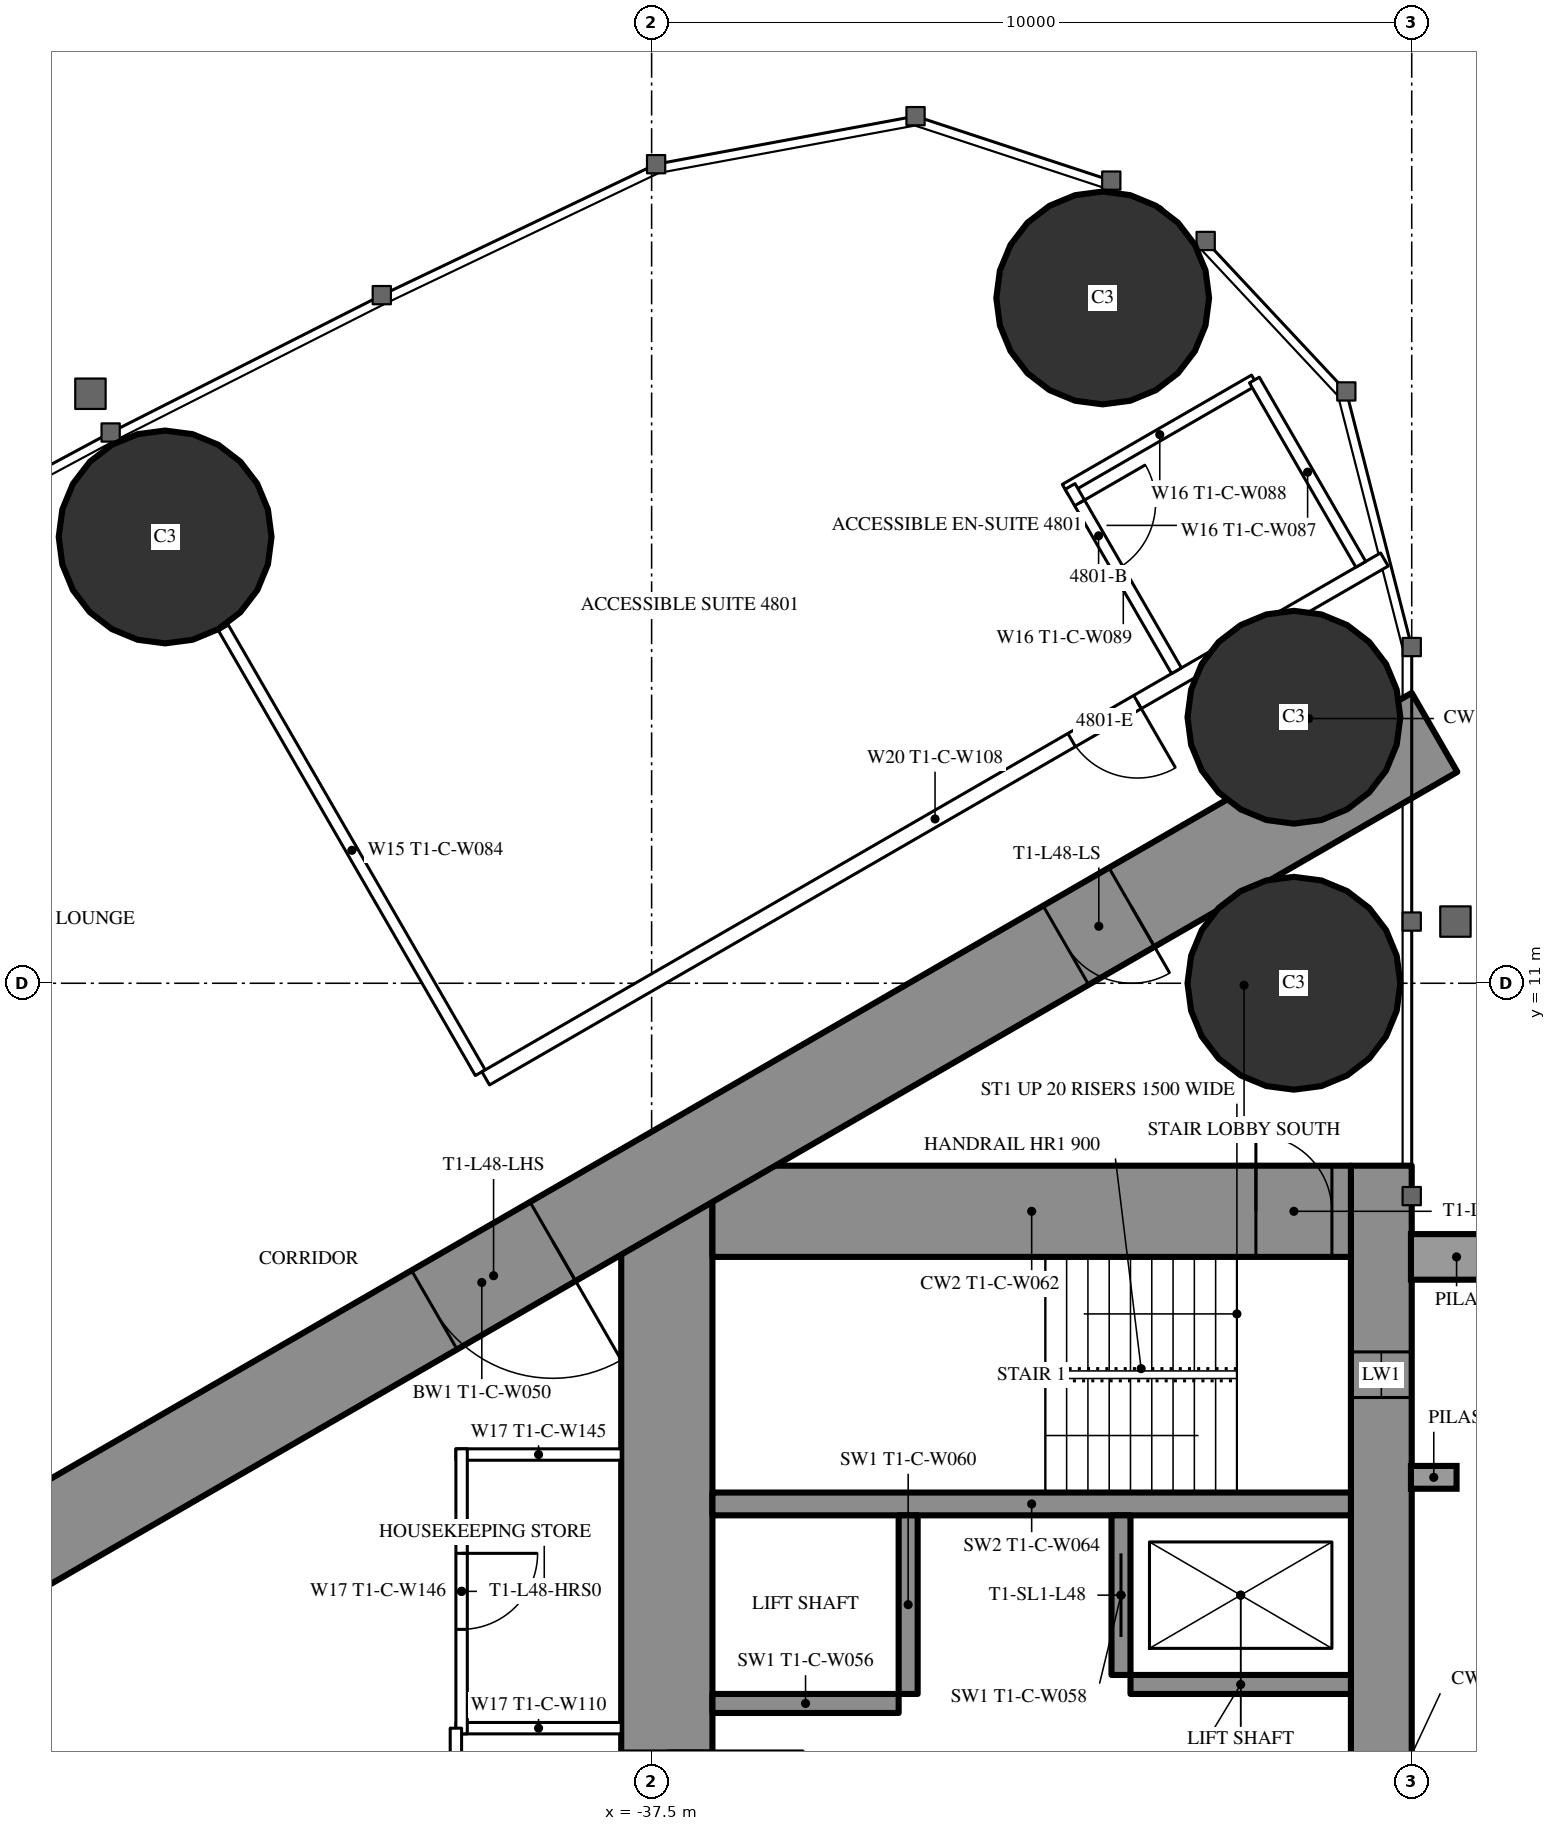
"""IFC4 building model, lengths in metres.
Left out: names, types, materials, properties, quantities, classifications, styles, units other than length and angle.
Written with IfcOpenShell. Run it as: python <this file> out.ifc"""

import sys

from ifc_helpers import new_model, si_unit, direction, frame, frame_2d, origin, origin_2d, place, context, subcontext, project, spatial, rectangle, circle, extrude, element, fill, save


model = new_model("IFC4")
c1 = context("Model", 3, precision=1e-05, world=origin(), true_north=direction((0.0, 1.0)))
c2 = subcontext(c1, "Body", "Model", "MODEL_VIEW")
j1 = project(units=[si_unit("LENGTHUNIT", "METRE"), si_unit("PLANEANGLEUNIT", "RADIAN")], contexts=[c1])
p1 = place(None, origin())
s1 = spatial("IfcSite", under=j1, at=p1, CompositionType="ELEMENT")
p2 = place(p1, origin())
s2 = spatial("IfcBuilding", under=s1, at=p2, CompositionType="ELEMENT")
p3 = place(p2, frame((0.0, 0.0, 180.8)))
s3 = spatial("IfcBuildingStorey", under=s2, at=p3, CompositionType="ELEMENT", Elevation=180.8)
for number, where, z_axis, x_axis in (
    (1, (-31.565, 20.016, 0.0), (0.0, 0.0, 1.0), (1.0, 0.0, 0.0)),
    (2, (-29.05, 11.0, 0.0), (0.0, 0.0, 1.0), (1.0, 0.0, 0.0)),
    (3, (-29.05, 14.5, 0.0), (0.0, 0.0, 1.0), (1.0, 0.0, 0.0)),
    (4, (-43.9, 16.871, 0.0), (0.0, 0.0, 1.0), (1.0, 0.0, 0.0)),
):
    element("IfcColumn", number, at=place(p3, frame(where, z_axis=z_axis, x_axis=x_axis)), inside=s3, PredefinedType="COLUMN", context=c2, shape_type="SweptSolid", body=[
        extrude(circle(Radius=1.4, at=origin_2d()), origin(), (0.0, 0.0, 1.0), 3.5),
    ])
p4 = place(p3, frame((-27.9, 8.6, 0.0), z_axis=(0.0, 0.0, 1.0), x_axis=(0.0, -1.0, 0.0)))
e5 = element("IfcWall", 5, at=p4, inside=s3, PredefinedType="SHEAR", context=c2, shape_type="SweptSolid", body=[
    extrude(rectangle(XDim=17.2, YDim=0.8, at=frame_2d((8.6, 0.0))), origin(), (0.0, 0.0, 1.0), 3.5),
])
p5 = place(p4, frame((2.45, 0.0, 0.6)))
e6 = element("IfcOpeningElement", 6, at=p5, cuts=e5, PredefinedType="OPENING", context=c2, shape_type="SweptSolid", body=[
    extrude(rectangle(XDim=0.6, YDim=2.1, at=frame_2d((0.3, 1.05))), frame((0.0, 0.41, 0.0), z_axis=(0.0, -1.0, 0.0), x_axis=(1.0, 0.0, 0.0)), (0.0, 0.0, 1.0), 0.82),
])
p6 = place(p4, frame((14.15, 0.0, 0.6)))
e7 = element("IfcOpeningElement", 7, at=p6, cuts=e5, PredefinedType="OPENING", context=c2, shape_type="SweptSolid", body=[
    extrude(rectangle(XDim=0.6, YDim=2.1, at=frame_2d((0.3, 1.05))), frame((0.0, 0.41, 0.0), z_axis=(0.0, -1.0, 0.0), x_axis=(1.0, 0.0, 0.0)), (0.0, 0.0, 1.0), 0.82),
])
p7 = place(p3, frame((-37.3, 8.6, 0.0), z_axis=(0.0, 0.0, 1.0), x_axis=(0.0, -1.0, 0.0)))
e8 = element("IfcWall", 8, at=p7, inside=s3, PredefinedType="SHEAR", context=c2, shape_type="SweptSolid", body=[
    extrude(rectangle(XDim=17.2, YDim=1.2, at=frame_2d((8.6, 0.0))), origin(), (0.0, 0.0, 1.0), 3.5),
])
p8 = place(p7, frame((7.7, 0.0, 0.0)))
e9 = element("IfcOpeningElement", 9, at=p8, cuts=e8, PredefinedType="OPENING", context=c2, shape_type="SweptSolid", body=[
    extrude(rectangle(XDim=1.8, YDim=2.2, at=frame_2d((0.9, 1.1))), frame((0.0, 0.61, 0.0), z_axis=(0.0, -1.0, 0.0), x_axis=(1.0, 0.0, 0.0)), (0.0, 0.0, 1.0), 1.22),
])
p9 = place(p3, frame((-28.3, 8.0, 0.0), z_axis=(0.0, 0.0, 1.0), x_axis=(-1.0, 0.0, 0.0)))
e10 = element("IfcWall", 10, at=p9, inside=s3, PredefinedType="SHEAR", context=c2, shape_type="SweptSolid", body=[
    extrude(rectangle(XDim=8.4, YDim=1.2, at=frame_2d((4.2, 0.0))), origin(), (0.0, 0.0, 1.0), 3.5),
])
p10 = place(p9, frame((0.25, 0.0, 0.0)))
e11 = element("IfcOpeningElement", 11, at=p10, cuts=e10, PredefinedType="OPENING", context=c2, shape_type="SweptSolid", body=[
    extrude(rectangle(XDim=1.0, YDim=2.2, at=frame_2d((0.5, 1.1))), frame((0.0, 0.61, 0.0), z_axis=(0.0, -1.0, 0.0), x_axis=(1.0, 0.0, 0.0)), (0.0, 0.0, 1.0), 1.22),
])
p11 = place(p3, frame((-28.3, 4.15, 0.0), z_axis=(0.0, 0.0, 1.0), x_axis=(-1.0, 0.0, 0.0)))
e12 = element("IfcWall", 12, at=p11, inside=s3, PredefinedType="SHEAR", context=c2, shape_type="SweptSolid", body=[
    extrude(rectangle(XDim=8.4, YDim=0.3, at=frame_2d((4.2, 0.0))), origin(), (0.0, 0.0, 1.0), 3.5),
])
p12 = place(p3, frame((-31.325, 4.0, 0.0), z_axis=(0.0, 0.0, 1.0), x_axis=(0.0, -1.0, 0.0)))
e13 = element("IfcWall", 13, at=p12, inside=s3, PredefinedType="SHEAR", context=c2, shape_type="SweptSolid", body=[
    extrude(rectangle(XDim=2.1, YDim=0.25, at=frame_2d((1.05, 0.0))), origin(), (0.0, 0.0, 1.0), 3.5),
])
p13 = place(p12, frame((0.5, 0.0, 0.0)))
e14 = element("IfcOpeningElement", 14, at=p13, cuts=e13, PredefinedType="OPENING", context=c2, shape_type="SweptSolid", body=[
    extrude(rectangle(XDim=1.1, YDim=2.2, at=frame_2d((0.55, 1.1))), frame((0.0, 0.135, 0.0), z_axis=(0.0, -1.0, 0.0), x_axis=(1.0, 0.0, 0.0)), (0.0, 0.0, 1.0), 0.27),
])
p14 = place(p3, frame((-34.125, 4.0, 0.0), z_axis=(0.0, 0.0, 1.0), x_axis=(0.0, -1.0, 0.0)))
e15 = element("IfcWall", 15, at=p14, inside=s3, PredefinedType="SHEAR", context=c2, shape_type="SweptSolid", body=[
    extrude(rectangle(XDim=2.35, YDim=0.25, at=frame_2d((1.175, 0.0))), origin(), (0.0, 0.0, 1.0), 3.5),
])
p15 = place(p3, frame((-28.3, 1.775, 0.0), z_axis=(0.0, 0.0, 1.0), x_axis=(-1.0, 0.0, 0.0)))
e16 = element("IfcWall", 16, at=p15, inside=s3, PredefinedType="SHEAR", context=c2, shape_type="SweptSolid", body=[
    extrude(rectangle(XDim=2.9, YDim=0.25, at=frame_2d((1.45, 0.0))), origin(), (0.0, 0.0, 1.0), 3.5),
])
p16 = place(p3, frame((-34.25, 1.525, 0.0), z_axis=(0.0, 0.0, 1.0), x_axis=(-1.0, 0.0, 0.0)))
e17 = element("IfcWall", 17, at=p16, inside=s3, PredefinedType="SHEAR", context=c2, shape_type="SweptSolid", body=[
    extrude(rectangle(XDim=2.45, YDim=0.25, at=frame_2d((1.225, 0.0))), origin(), (0.0, 0.0, 1.0), 3.5),
])
p17 = place(p3, frame((-27.2, 14.3, 0.0), z_axis=(0.0, 0.0, 1.0), x_axis=(-0.866026593062, -0.499997940104, 0.0)))
e18 = element("IfcWall", 18, at=p17, inside=s3, PredefinedType="SHEAR", context=c2, shape_type="SweptSolid", body=[
    extrude(rectangle(XDim=28.946, YDim=1.2, at=frame_2d((14.473, 0.0))), origin(), (0.0, 0.0, 1.0), 3.5),
])
p18 = place(p17, frame((4.6, 0.0, 0.0)))
e19 = element("IfcOpeningElement", 19, at=p18, cuts=e18, PredefinedType="OPENING", context=c2, shape_type="SweptSolid", body=[
    extrude(rectangle(XDim=1.0, YDim=2.2, at=frame_2d((0.5, 1.1))), frame((0.0, 0.61, 0.0), z_axis=(0.0, -1.0, 0.0), x_axis=(1.0, 0.0, 0.0)), (0.0, 0.0, 1.0), 1.22),
])
p19 = place(p17, frame((13.395, 0.0, 0.0)))
e20 = element("IfcOpeningElement", 20, at=p19, cuts=e18, PredefinedType="OPENING", context=c2, shape_type="SweptSolid", body=[
    extrude(rectangle(XDim=1.8, YDim=2.2, at=frame_2d((0.9, 1.1))), frame((0.0, 0.61, 0.0), z_axis=(0.0, -1.0, 0.0), x_axis=(1.0, 0.0, 0.0)), (0.0, 0.0, 1.0), 1.22),
])
p20 = place(p3, frame((-39.754, 9.823, 0.0), z_axis=(0.0, 0.0, 1.0), x_axis=(-0.499997670926, 0.866026748472, 0.0)))
e21 = element("IfcWall", 21, at=p20, inside=s3, PredefinedType="PARTITIONING", context=c2, shape_type="SweptSolid", body=[
    extrude(rectangle(XDim=6.757, YDim=0.15, at=frame_2d((3.379, 0.0))), origin(), (0.0, 0.0, 1.0), 2.3),
])
p21 = place(p3, frame((-27.86, 16.575, 0.0), z_axis=(0.0, 0.0, 1.0), x_axis=(-0.866026850238, -0.499997494661, 0.0)))
e22 = element("IfcWall", 22, at=p21, inside=s3, PredefinedType="PARTITIONING", context=c2, shape_type="SweptSolid", body=[
    extrude(rectangle(XDim=13.651, YDim=0.2, at=frame_2d((6.826, 0.0))), origin(), (0.0, 0.0, 1.0), 3.25),
])
p22 = place(p21, frame((3.75, 0.0, 0.0)))
e23 = element("IfcOpeningElement", 23, at=p22, cuts=e22, PredefinedType="OPENING", context=c2, shape_type="SweptSolid", body=[
    extrude(rectangle(XDim=1.0, YDim=2.2, at=frame_2d((0.5, 1.1))), frame((0.0, 0.11, 0.0), z_axis=(0.0, -1.0, 0.0), x_axis=(1.0, 0.0, 0.0)), (0.0, 0.0, 1.0), 0.22),
])
p23 = place(p3, frame((-29.57, 18.936, 0.0), z_axis=(0.0, 0.0, 1.0), x_axis=(-0.866018712932, -0.500011588718, 0.0)))
e24 = element("IfcWall", 24, at=p23, inside=s3, PredefinedType="PARTITIONING", context=c2, shape_type="SweptSolid", body=[
    extrude(rectangle(XDim=2.875, YDim=0.15, at=frame_2d((1.438, 0.0))), origin(), (0.0, 0.0, 1.0), 3.25),
])
p24 = place(p3, frame((-30.595, 15.111, 0.0), z_axis=(0.0, 0.0, 1.0), x_axis=(-0.49998411664, 0.866034573852, 0.0)))
e25 = element("IfcWall", 25, at=p24, inside=s3, PredefinedType="PARTITIONING", context=c2, shape_type="SweptSolid", body=[
    extrude(rectangle(XDim=2.8, YDim=0.15, at=frame_2d((1.4, 0.0))), origin(), (0.0, 0.0, 1.0), 3.25),
])
p25 = place(p24, frame((1.55, 0.0, 0.0)))
e26 = element("IfcOpeningElement", 26, at=p25, cuts=e25, PredefinedType="OPENING", context=c2, shape_type="SweptSolid", body=[
    extrude(rectangle(XDim=1.0, YDim=2.2, at=frame_2d((0.5, 1.1))), frame((0.0, 0.085, 0.0), z_axis=(0.0, -1.0, 0.0), x_axis=(1.0, 0.0, 0.0)), (0.0, 0.0, 1.0), 0.17),
])
p26 = place(p3, frame((-28.17, 16.511, 0.0), z_axis=(0.0, 0.0, 1.0), x_axis=(-0.49994636267, 0.866056369097, 0.0)))
e27 = element("IfcWall", 27, at=p26, inside=s3, PredefinedType="PARTITIONING", context=c2, shape_type="SweptSolid", body=[
    extrude(rectangle(XDim=2.8, YDim=0.15, at=frame_2d((1.4, 0.0))), origin(), (0.0, 0.0, 1.0), 3.25),
])
for number, where, z_axis, x_axis in (
    (28, (-37.9, 1.2, 0.0), (0.0, 0.0, 1.0), (-1.0, 0.0, 0.0)),
    (29, (-37.9, 4.8, 0.0), (0.0, 0.0, 1.0), (-1.0, 0.0, 0.0)),
):
    element("IfcWall", number, at=place(p3, frame(where, z_axis=z_axis, x_axis=x_axis)), inside=s3, PredefinedType="PARTITIONING", context=c2, shape_type="SweptSolid", body=[
        extrude(rectangle(XDim=2.175, YDim=0.15, at=frame_2d((1.087, 0.0))), origin(), (0.0, 0.0, 1.0), 3.25),
    ])
p27 = place(p3, frame((-40.0, 4.875, 0.0), z_axis=(0.0, 0.0, 1.0), x_axis=(0.0, -1.0, 0.0)))
e30 = element("IfcWall", 30, at=p27, inside=s3, PredefinedType="PARTITIONING", context=c2, shape_type="SweptSolid", body=[
    extrude(rectangle(XDim=3.75, YDim=0.15, at=frame_2d((1.875, 0.0))), origin(), (0.0, 0.0, 1.0), 3.25),
])
p28 = place(p27, frame((1.375, 0.0, 0.0)))
e31 = element("IfcOpeningElement", 31, at=p28, cuts=e30, PredefinedType="OPENING", context=c2, shape_type="SweptSolid", body=[
    extrude(rectangle(XDim=1.0, YDim=2.2, at=frame_2d((0.5, 1.1))), frame((0.0, 0.085, 0.0), z_axis=(0.0, -1.0, 0.0), x_axis=(1.0, 0.0, 0.0)), (0.0, 0.0, 1.0), 0.17),
])
p29 = place(p3, frame((-40.075, 1.2, 0.0), z_axis=(0.0, 0.0, 1.0), x_axis=(0.0, -1.0, 0.0)))
e32 = element("IfcWall", 32, at=p29, inside=s3, PredefinedType="PARTITIONING", context=c2, shape_type="SweptSolid", body=[
    extrude(rectangle(XDim=7.374, YDim=0.15, at=frame_2d((3.687, 0.0))), origin(), (0.0, 0.0, 1.0), 3.25),
])
p30 = place(p29, frame((2.787, 0.0, 0.0)))
e33 = element("IfcOpeningElement", 33, at=p30, cuts=e32, PredefinedType="OPENING", context=c2, shape_type="SweptSolid", body=[
    extrude(rectangle(XDim=1.8, YDim=2.2, at=frame_2d((0.9, 1.1))), frame((0.0, 0.085, 0.0), z_axis=(0.0, -1.0, 0.0), x_axis=(1.0, 0.0, 0.0)), (0.0, 0.0, 1.0), 0.17),
])
p31 = place(p25, origin())
e34 = element("IfcDoor", 34, at=p31, inside=s3, OperationType="SINGLE_SWING_RIGHT", PredefinedType="DOOR", context=c2, shape_type="SweptSolid", body=[
    extrude(rectangle(XDim=1.0, YDim=2.2, at=frame_2d((0.5, 1.1))), frame((0.0, 0.025, 0.0), z_axis=(0.0, -1.0, 0.0), x_axis=(1.0, 0.0, 0.0)), (0.0, 0.0, 1.0), 0.05),
])
fill(e26, e34)
p32 = place(p22, origin())
e35 = element("IfcDoor", 35, at=p32, inside=s3, OperationType="SINGLE_SWING_LEFT", PredefinedType="DOOR", context=c2, shape_type="SweptSolid", body=[
    extrude(rectangle(XDim=1.0, YDim=2.2, at=frame_2d((0.5, 1.1))), frame((0.0, 0.025, 0.0), z_axis=(0.0, -1.0, 0.0), x_axis=(1.0, 0.0, 0.0)), (0.0, 0.0, 1.0), 0.05),
])
fill(e23, e35)
p33 = place(p28, origin())
e36 = element("IfcDoor", 36, at=p33, inside=s3, OperationType="SINGLE_SWING_LEFT", PredefinedType="DOOR", context=c2, shape_type="SweptSolid", body=[
    extrude(rectangle(XDim=1.0, YDim=2.2, at=frame_2d((0.5, 1.1))), frame((0.0, 0.025, 0.0), z_axis=(0.0, -1.0, 0.0), x_axis=(1.0, 0.0, 0.0)), (0.0, 0.0, 1.0), 0.05),
])
fill(e31, e36)
p34 = place(p18, origin())
e37 = element("IfcDoor", 37, at=p34, inside=s3, OperationType="SINGLE_SWING_LEFT", PredefinedType="DOOR", context=c2, shape_type="SweptSolid", body=[
    extrude(rectangle(XDim=1.0, YDim=2.2, at=frame_2d((0.5, 1.1))), frame((0.0, 0.025, 0.0), z_axis=(0.0, -1.0, 0.0), x_axis=(1.0, 0.0, 0.0)), (0.0, 0.0, 1.0), 0.05),
])
fill(e19, e37)
p35 = place(p19, origin())
e38 = element("IfcDoor", 38, at=p35, inside=s3, OperationType="DOUBLE_DOOR_SINGLE_SWING", PredefinedType="DOOR", context=c2, shape_type="SweptSolid", body=[
    extrude(rectangle(XDim=1.8, YDim=2.2, at=frame_2d((0.9, 1.1))), frame((0.0, 0.025, 0.0), z_axis=(0.0, -1.0, 0.0), x_axis=(1.0, 0.0, 0.0)), (0.0, 0.0, 1.0), 0.05),
])
fill(e20, e38)
p36 = place(p8, origin())
e39 = element("IfcDoor", 39, at=p36, inside=s3, OperationType="DOUBLE_DOOR_SINGLE_SWING", PredefinedType="DOOR", context=c2, shape_type="SweptSolid", body=[
    extrude(rectangle(XDim=1.8, YDim=2.2, at=frame_2d((0.9, 1.1))), frame((0.0, 0.025, 0.0), z_axis=(0.0, -1.0, 0.0), x_axis=(1.0, 0.0, 0.0)), (0.0, 0.0, 1.0), 0.05),
])
fill(e9, e39)
p37 = place(p10, origin())
e40 = element("IfcDoor", 40, at=p37, inside=s3, OperationType="SINGLE_SWING_RIGHT", PredefinedType="DOOR", context=c2, shape_type="SweptSolid", body=[
    extrude(rectangle(XDim=1.0, YDim=2.2, at=frame_2d((0.5, 1.1))), frame((0.0, 0.025, 0.0), z_axis=(0.0, -1.0, 0.0), x_axis=(1.0, 0.0, 0.0)), (0.0, 0.0, 1.0), 0.05),
])
fill(e11, e40)
p38 = place(p13, origin())
e41 = element("IfcDoor", 41, at=p38, inside=s3, OperationType="SLIDING_TO_LEFT", PredefinedType="USERDEFINED", context=c2, shape_type="SweptSolid", body=[
    extrude(rectangle(XDim=1.1, YDim=2.2, at=frame_2d((0.55, 1.1))), frame((0.0, 0.025, 0.0), z_axis=(0.0, -1.0, 0.0), x_axis=(1.0, 0.0, 0.0)), (0.0, 0.0, 1.0), 0.05),
])
fill(e14, e41)
p39 = place(p5, origin())
e42 = element("IfcWindow", 42, at=p39, inside=s3, PartitioningType="SINGLE_PANEL", PredefinedType="WINDOW", context=c2, shape_type="SweptSolid", body=[
    extrude(rectangle(XDim=0.6, YDim=2.1, at=frame_2d((0.3, 1.05))), frame((0.0, 0.03, 0.0), z_axis=(0.0, -1.0, 0.0), x_axis=(1.0, 0.0, 0.0)), (0.0, 0.0, 1.0), 0.06),
])
fill(e6, e42)
save(model, sys.argv[1])
